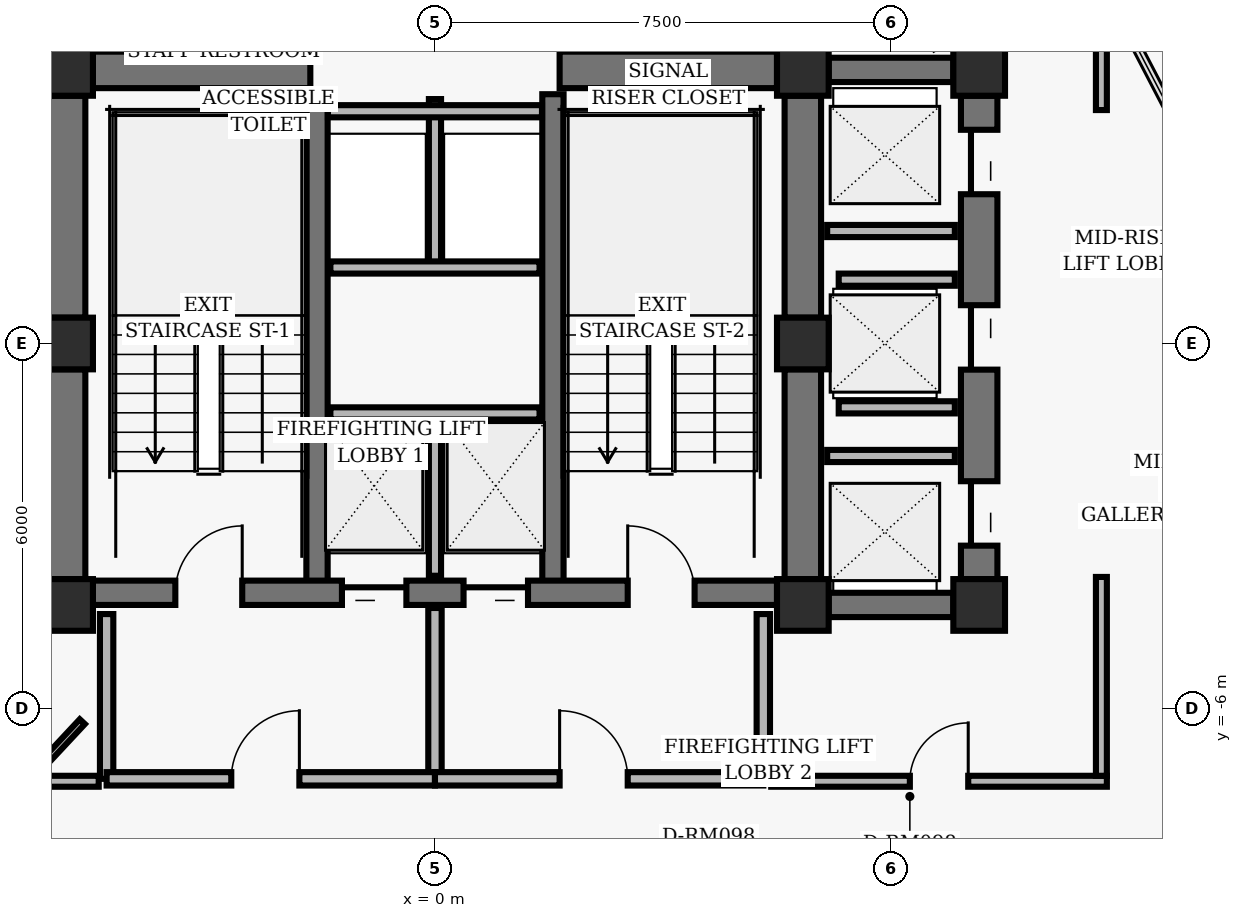
"""IFC4 building model, lengths in metres.
Left out: names, types, materials, properties, quantities, classifications, styles, units other than length and angle.
Written with IfcOpenShell. Run it as: python <this file> out.ifc"""

import sys

from ifc_helpers import new_model, si_unit, direction, frame, frame_2d, origin, origin_2d, place, context, subcontext, project, spatial, rectangle, hollow_rectangle, extrude, element, fill, save


model = new_model("IFC4")
c1 = context("Model", 3, precision=1e-05, world=origin(), true_north=direction((0.0, 1.0)))
c2 = subcontext(c1, "Body", "Model", "MODEL_VIEW")
j1 = project(units=[si_unit("LENGTHUNIT", "METRE"), si_unit("PLANEANGLEUNIT", "RADIAN")], contexts=[c1])
p1 = place(None, origin())
s1 = spatial("IfcSite", under=j1, at=p1, CompositionType="ELEMENT")
p2 = place(p1, origin())
s2 = spatial("IfcBuilding", under=s1, at=p2, CompositionType="ELEMENT")
p3 = place(p2, frame((0.0, 0.0, 144.16)))
s3 = spatial("IfcBuildingStorey", under=s2, at=p3, CompositionType="ELEMENT", Elevation=144.16)
for number, where, z_axis, x_axis in (
    (1, (-6.05, 4.5, 0.0), (0.0, 0.0, 1.0), (1.0, 0.0, 0.0)),
    (2, (6.05, 4.5, 0.0), (0.0, 0.0, 1.0), (1.0, 0.0, 0.0)),
    (3, (-6.05, 0.0, 0.0), (0.0, 0.0, 1.0), (1.0, 0.0, 0.0)),
    (4, (6.05, 0.0, 0.0), (0.0, 0.0, 1.0), (1.0, 0.0, 0.0)),
    (5, (-6.05, -4.3, 0.0), (0.0, 0.0, 1.0), (1.0, 0.0, 0.0)),
    (6, (6.05, -4.3, 0.0), (0.0, 0.0, 1.0), (1.0, 0.0, 0.0)),
    (7, (8.95, 4.5, 0.0), (0.0, 0.0, 1.0), (1.0, 0.0, 0.0)),
    (8, (8.95, -4.3, 0.0), (0.0, 0.0, 1.0), (1.0, 0.0, 0.0)),
):
    element("IfcColumn", number, at=place(p3, frame(where, z_axis=z_axis, x_axis=x_axis)), inside=s3, PredefinedType="COLUMN", context=c2, shape_type="SweptSolid", body=[
        extrude(hollow_rectangle(XDim=0.85, YDim=0.85, WallThickness=0.055, InnerFilletRadius=0.02, OuterFilletRadius=0.04, at=origin_2d()), origin(), (0.0, 0.0, 1.0), 3.04),
    ])
p4 = place(p3, frame((-6.05, 0.425, 0.0), z_axis=(0.0, 0.0, 1.0), x_axis=(0.0, 1.0, 0.0)))
e9 = element("IfcWall", 9, at=p4, inside=s3, PredefinedType="SHEAR", context=c2, shape_type="SweptSolid", body=[
    extrude(rectangle(XDim=3.65, YDim=0.6, at=frame_2d((1.825, 0.0))), origin(), (0.0, 0.0, 1.0), 2.618),
])
p5 = place(p3, frame((-6.05, -3.875, 0.0), z_axis=(0.0, 0.0, 1.0), x_axis=(0.0, 1.0, 0.0)))
e10 = element("IfcWall", 10, at=p5, inside=s3, PredefinedType="SHEAR", context=c2, shape_type="SweptSolid", body=[
    extrude(rectangle(XDim=3.45, YDim=0.6, at=frame_2d((1.725, 0.0))), origin(), (0.0, 0.0, 1.0), 2.618),
])
p6 = place(p3, frame((6.05, 0.425, 0.0), z_axis=(0.0, 0.0, 1.0), x_axis=(0.0, 1.0, 0.0)))
e11 = element("IfcWall", 11, at=p6, inside=s3, PredefinedType="SHEAR", context=c2, shape_type="SweptSolid", body=[
    extrude(rectangle(XDim=3.65, YDim=0.6, at=frame_2d((1.825, 0.0))), origin(), (0.0, 0.0, 1.0), 2.618),
])
p7 = place(p3, frame((6.05, -3.875, 0.0), z_axis=(0.0, 0.0, 1.0), x_axis=(0.0, 1.0, 0.0)))
e12 = element("IfcWall", 12, at=p7, inside=s3, PredefinedType="SHEAR", context=c2, shape_type="SweptSolid", body=[
    extrude(rectangle(XDim=3.45, YDim=0.6, at=frame_2d((1.725, 0.0))), origin(), (0.0, 0.0, 1.0), 2.618),
])
for number, where, z_axis, x_axis in (
    (13, (-1.94, -4.1, 0.0), (0.0, 0.0, 1.0), (0.0, 1.0, 0.0)),
    (14, (1.94, -4.1, 0.0), (0.0, 0.0, 1.0), (0.0, 1.0, 0.0)),
):
    element("IfcWall", number, at=place(p3, frame(where, z_axis=z_axis, x_axis=x_axis)), inside=s3, PredefinedType="SHEAR", context=c2, shape_type="SweptSolid", body=[
        extrude(rectangle(XDim=8.2, YDim=0.35, at=frame_2d((4.1, 0.0))), origin(), (0.0, 0.0, 1.0), 2.618),
    ])
p8 = place(p3, frame((-5.625, -4.1, 0.0), z_axis=(0.0, 0.0, 1.0), x_axis=(1.0, 0.0, 0.0)))
e15 = element("IfcWall", 15, at=p8, inside=s3, PredefinedType="SHEAR", context=c2, shape_type="SweptSolid", body=[
    extrude(rectangle(XDim=11.25, YDim=0.4, at=frame_2d((5.625, 0.0))), origin(), (0.0, 0.0, 1.0), 2.618),
])
p9 = place(p8, frame((1.355, 0.0, 0.0)))
e16 = element("IfcOpeningElement", 16, at=p9, cuts=e15, PredefinedType="OPENING", context=c2, shape_type="SweptSolid", body=[
    extrude(rectangle(XDim=1.1, YDim=2.04, at=frame_2d((0.55, 1.02))), frame((0.0, 0.21, 0.0), z_axis=(0.0, -1.0, 0.0), x_axis=(1.0, 0.0, 0.0)), (0.0, 0.0, 1.0), 0.42),
])
p10 = place(p8, frame((8.795, 0.0, 0.0)))
e17 = element("IfcOpeningElement", 17, at=p10, cuts=e15, PredefinedType="OPENING", context=c2, shape_type="SweptSolid", body=[
    extrude(rectangle(XDim=1.1, YDim=2.04, at=frame_2d((0.55, 1.02))), frame((0.0, 0.21, 0.0), z_axis=(0.0, -1.0, 0.0), x_axis=(1.0, 0.0, 0.0)), (0.0, 0.0, 1.0), 0.42),
])
p11 = place(p8, frame((4.095, 0.0, 0.0)))
e18 = element("IfcOpeningElement", 18, at=p11, cuts=e15, PredefinedType="OPENING", context=c2, shape_type="SweptSolid", body=[
    extrude(rectangle(XDim=1.06, YDim=2.04, at=frame_2d((0.53, 1.02))), frame((0.0, 0.21, 0.0), z_axis=(0.0, -1.0, 0.0), x_axis=(1.0, 0.0, 0.0)), (0.0, 0.0, 1.0), 0.42),
])
p12 = place(p8, frame((6.095, 0.0, 0.0)))
e19 = element("IfcOpeningElement", 19, at=p12, cuts=e15, PredefinedType="OPENING", context=c2, shape_type="SweptSolid", body=[
    extrude(rectangle(XDim=1.06, YDim=2.04, at=frame_2d((0.53, 1.02))), frame((0.0, 0.21, 0.0), z_axis=(0.0, -1.0, 0.0), x_axis=(1.0, 0.0, 0.0)), (0.0, 0.0, 1.0), 0.42),
])
for number, where, z_axis, x_axis in (
    (20, (-5.625, 4.5, 0.0), (0.0, 0.0, 1.0), (1.0, 0.0, 0.0)),
    (21, (2.05, 4.5, 0.0), (0.0, 0.0, 1.0), (1.0, 0.0, 0.0)),
):
    element("IfcWall", number, at=place(p3, frame(where, z_axis=z_axis, x_axis=x_axis)), inside=s3, PredefinedType="SHEAR", context=c2, shape_type="SweptSolid", body=[
        extrude(rectangle(XDim=3.575, YDim=0.6, at=frame_2d((1.788, 0.0))), origin(), (0.0, 0.0, 1.0), 2.618),
    ])
p13 = place(p3, frame((8.95, -3.875, 0.0), z_axis=(0.0, 0.0, 1.0), x_axis=(0.0, 1.0, 0.0)))
e22 = element("IfcWall", 22, at=p13, inside=s3, PredefinedType="SHEAR", context=c2, shape_type="SweptSolid", body=[
    extrude(rectangle(XDim=7.95, YDim=0.6, at=frame_2d((3.975, 0.0))), origin(), (0.0, 0.0, 1.0), 2.618),
])
p14 = place(p13, frame((0.55, 0.0, 0.0)))
e23 = element("IfcOpeningElement", 23, at=p14, cuts=e22, PredefinedType="OPENING", context=c2, shape_type="SweptSolid", body=[
    extrude(rectangle(XDim=1.06, YDim=2.04, at=frame_2d((0.53, 1.02))), frame((0.0, 0.31, 0.0), z_axis=(0.0, -1.0, 0.0), x_axis=(1.0, 0.0, 0.0)), (0.0, 0.0, 1.0), 0.62),
])
p15 = place(p13, frame((3.445, 0.0, 0.0)))
e24 = element("IfcOpeningElement", 24, at=p15, cuts=e22, PredefinedType="OPENING", context=c2, shape_type="SweptSolid", body=[
    extrude(rectangle(XDim=1.06, YDim=2.04, at=frame_2d((0.53, 1.02))), frame((0.0, 0.31, 0.0), z_axis=(0.0, -1.0, 0.0), x_axis=(1.0, 0.0, 0.0)), (0.0, 0.0, 1.0), 0.62),
])
p16 = place(p13, frame((6.33, 0.0, 0.0)))
e25 = element("IfcOpeningElement", 25, at=p16, cuts=e22, PredefinedType="OPENING", context=c2, shape_type="SweptSolid", body=[
    extrude(rectangle(XDim=1.06, YDim=2.04, at=frame_2d((0.53, 1.02))), frame((0.0, 0.31, 0.0), z_axis=(0.0, -1.0, 0.0), x_axis=(1.0, 0.0, 0.0)), (0.0, 0.0, 1.0), 0.62),
])
for number, where, z_axis, x_axis in (
    (26, (6.475, 4.5, 0.0), (0.0, 0.0, 1.0), (1.0, 0.0, 0.0)),
    (27, (6.475, -4.3, 0.0), (0.0, 0.0, 1.0), (1.0, 0.0, 0.0)),
):
    element("IfcWall", number, at=place(p3, frame(where, z_axis=z_axis, x_axis=x_axis)), inside=s3, PredefinedType="SHEAR", context=c2, shape_type="SweptSolid", body=[
        extrude(rectangle(XDim=2.05, YDim=0.4, at=frame_2d((1.025, 0.0))), origin(), (0.0, 0.0, 1.0), 2.618),
    ])
p17 = place(p3, frame((0.0, -3.82, 0.0), z_axis=(0.0, 0.0, 1.0), x_axis=(0.0, 1.0, 0.0)))
e28 = element("IfcWall", 28, at=p17, inside=s3, PredefinedType="PARTITIONING", context=c2, shape_type="SweptSolid", body=[
    extrude(rectangle(XDim=2.67, YDim=0.2, at=frame_2d((1.335, 0.0))), origin(), (0.0, 0.0, 1.0), 2.593),
])
p18 = place(p3, frame((-1.72, -1.15, 0.0), z_axis=(0.0, 0.0, 1.0), x_axis=(1.0, 0.0, 0.0)))
e29 = element("IfcWall", 29, at=p18, inside=s3, PredefinedType="PARTITIONING", context=c2, shape_type="SweptSolid", body=[
    extrude(rectangle(XDim=3.44, YDim=0.2, at=frame_2d((1.72, 0.0))), origin(), (0.0, 0.0, 1.0), 2.593),
])
for number, where, z_axis, x_axis in (
    (30, (-5.4, -7.16, 0.0), (0.0, 0.0, 1.0), (0.0, 1.0, 0.0)),
    (31, (5.4, -7.16, 0.0), (0.0, 0.0, 1.0), (0.0, 1.0, 0.0)),
):
    element("IfcWall", number, at=place(p3, frame(where, z_axis=z_axis, x_axis=x_axis)), inside=s3, PredefinedType="PARTITIONING", context=c2, shape_type="SweptSolid", body=[
        extrude(rectangle(XDim=2.71, YDim=0.22, at=frame_2d((1.355, 0.0))), origin(), (0.0, 0.0, 1.0), 2.593),
    ])
p19 = place(p3, frame((0.0, -7.16, 0.0), z_axis=(0.0, 0.0, 1.0), x_axis=(0.0, 1.0, 0.0)))
e32 = element("IfcWall", 32, at=p19, inside=s3, PredefinedType="PARTITIONING", context=c2, shape_type="SweptSolid", body=[
    extrude(rectangle(XDim=2.81, YDim=0.22, at=frame_2d((1.405, 0.0))), origin(), (0.0, 0.0, 1.0), 2.593),
])
p20 = place(p3, frame((-5.4, -7.16, 0.0), z_axis=(0.0, 0.0, 1.0), x_axis=(1.0, 0.0, 0.0)))
e33 = element("IfcWall", 33, at=p20, inside=s3, PredefinedType="PARTITIONING", context=c2, shape_type="SweptSolid", body=[
    extrude(rectangle(XDim=5.4, YDim=0.22, at=frame_2d((2.7, 0.0))), origin(), (0.0, 0.0, 1.0), 2.16),
])
p21 = place(p20, frame((2.05, 0.0, 0.0)))
e34 = element("IfcOpeningElement", 34, at=p21, cuts=e33, PredefinedType="OPENING", context=c2, shape_type="SweptSolid", body=[
    extrude(rectangle(XDim=1.12, YDim=2.02, at=frame_2d((0.56, 1.01))), frame((0.0, 0.12, 0.0), z_axis=(0.0, -1.0, 0.0), x_axis=(1.0, 0.0, 0.0)), (0.0, 0.0, 1.0), 0.24),
])
p22 = place(p3, frame((0.0, -7.16, 0.0), z_axis=(0.0, 0.0, 1.0), x_axis=(1.0, 0.0, 0.0)))
e35 = element("IfcWall", 35, at=p22, inside=s3, PredefinedType="PARTITIONING", context=c2, shape_type="SweptSolid", body=[
    extrude(rectangle(XDim=5.4, YDim=0.22, at=frame_2d((2.7, 0.0))), origin(), (0.0, 0.0, 1.0), 2.16),
])
p23 = place(p22, frame((2.05, 0.0, 0.0)))
e36 = element("IfcOpeningElement", 36, at=p23, cuts=e35, PredefinedType="OPENING", context=c2, shape_type="SweptSolid", body=[
    extrude(rectangle(XDim=1.12, YDim=2.02, at=frame_2d((0.56, 1.01))), frame((0.0, 0.12, 0.0), z_axis=(0.0, -1.0, 0.0), x_axis=(1.0, 0.0, 0.0)), (0.0, 0.0, 1.0), 0.24),
])
p24 = place(p3, frame((0.0, 1.25, 0.0), z_axis=(0.0, 0.0, 1.0), x_axis=(0.0, 1.0, 0.0)))
e37 = element("IfcWall", 37, at=p24, inside=s3, PredefinedType="PARTITIONING", context=c2, shape_type="SweptSolid", body=[
    extrude(rectangle(XDim=2.77, YDim=0.2, at=frame_2d((1.385, 0.0))), origin(), (0.0, 0.0, 1.0), 2.593),
])
p25 = place(p3, frame((-1.72, 1.25, 0.0), z_axis=(0.0, 0.0, 1.0), x_axis=(1.0, 0.0, 0.0)))
e38 = element("IfcWall", 38, at=p25, inside=s3, PredefinedType="PARTITIONING", context=c2, shape_type="SweptSolid", body=[
    extrude(rectangle(XDim=3.44, YDim=0.2, at=frame_2d((1.72, 0.0))), origin(), (0.0, 0.0, 1.0), 2.593),
])
p26 = place(p3, frame((-1.76, 3.82, 0.0), z_axis=(0.0, 0.0, 1.0), x_axis=(1.0, 0.0, 0.0)))
e39 = element("IfcWall", 39, at=p26, inside=s3, PredefinedType="PARTITIONING", context=c2, shape_type="SweptSolid", body=[
    extrude(rectangle(XDim=3.52, YDim=0.2, at=frame_2d((1.76, 0.0))), origin(), (0.0, 0.0, 1.0), 2.593),
])
for number, where, z_axis, x_axis in (
    (40, (6.45, -1.85, 0.0), (0.0, 0.0, 1.0), (1.0, 0.0, 0.0)),
    (41, (6.45, 1.85, 0.0), (0.0, 0.0, 1.0), (1.0, 0.0, 0.0)),
):
    element("IfcWall", number, at=place(p3, frame(where, z_axis=z_axis, x_axis=x_axis)), inside=s3, PredefinedType="PARTITIONING", context=c2, shape_type="SweptSolid", body=[
        extrude(rectangle(XDim=2.1, YDim=0.2, at=frame_2d((1.05, 0.0))), origin(), (0.0, 0.0, 1.0), 2.593),
    ])
for number, where, z_axis, x_axis in (
    (42, (6.64, -1.05, 0.0), (0.0, 0.0, 1.0), (1.0, 0.0, 0.0)),
    (43, (6.64, 1.05, 0.0), (0.0, 0.0, 1.0), (1.0, 0.0, 0.0)),
):
    element("IfcWall", number, at=place(p3, frame(where, z_axis=z_axis, x_axis=x_axis)), inside=s3, PredefinedType="PARTITIONING", context=c2, shape_type="SweptSolid", body=[
        extrude(rectangle(XDim=1.91, YDim=0.2, at=frame_2d((0.955, 0.0))), origin(), (0.0, 0.0, 1.0), 2.593),
    ])
p27 = place(p3, frame((10.003, 9.07, 0.0), z_axis=(0.0, 0.0, 1.0), x_axis=(0.461740291408, -0.887015165198, 0.0)))
e44 = element("IfcWall", 44, at=p27, inside=s3, PredefinedType="PARTITIONING", context=c2, shape_type="SweptSolid", body=[
    extrude(rectangle(XDim=9.976, YDim=0.18, at=frame_2d((4.988, 0.0))), origin(), (0.0, 0.0, 1.0), 2.593),
])
p28 = place(p27, frame((5.689, 0.0, 0.0)))
e45 = element("IfcOpeningElement", 45, at=p28, cuts=e44, PredefinedType="OPENING", context=c2, shape_type="SweptSolid", body=[
    extrude(rectangle(XDim=0.96, YDim=2.02, at=frame_2d((0.48, 1.01))), frame((0.0, 0.1, 0.0), z_axis=(0.0, -1.0, 0.0), x_axis=(1.0, 0.0, 0.0)), (0.0, 0.0, 1.0), 0.2),
])
p29 = place(p3, frame((5.53, -7.2, 0.0), z_axis=(0.0, 0.0, 1.0), x_axis=(1.0, 0.0, 0.0)))
e46 = element("IfcWall", 46, at=p29, inside=s3, PredefinedType="PARTITIONING", context=c2, shape_type="SweptSolid", body=[
    extrude(rectangle(XDim=5.52, YDim=0.18, at=frame_2d((2.76, 0.0))), origin(), (0.0, 0.0, 1.0), 2.16),
])
p30 = place(p29, frame((2.28, 0.0, 0.0)))
e47 = element("IfcOpeningElement", 47, at=p30, cuts=e46, PredefinedType="OPENING", context=c2, shape_type="SweptSolid", body=[
    extrude(rectangle(XDim=0.96, YDim=2.02, at=frame_2d((0.48, 1.01))), frame((0.0, 0.1, 0.0), z_axis=(0.0, -1.0, 0.0), x_axis=(1.0, 0.0, 0.0)), (0.0, 0.0, 1.0), 0.2),
])
for number, where, z_axis, x_axis in (
    (48, (10.96, -7.11, 0.0), (0.0, 0.0, 1.0), (0.0, 1.0, 0.0)),
    (49, (10.96, 3.84, 0.0), (0.0, 0.0, 1.0), (0.0, 1.0, 0.0)),
):
    element("IfcWall", number, at=place(p3, frame(where, z_axis=z_axis, x_axis=x_axis)), inside=s3, PredefinedType="PARTITIONING", context=c2, shape_type="SweptSolid", body=[
        extrude(rectangle(XDim=3.271, YDim=0.18, at=frame_2d((1.635, 0.0))), origin(), (0.0, 0.0, 1.0), 2.593),
    ])
p31 = place(p3, frame((-6.59, -7.2, 0.0), z_axis=(0.0, 0.0, 1.0), x_axis=(1.0, 0.0, 0.0)))
e50 = element("IfcWall", 50, at=p31, inside=s3, PredefinedType="PARTITIONING", context=c2, shape_type="SweptSolid", body=[
    extrude(rectangle(XDim=1.06, YDim=0.18, at=frame_2d((0.53, 0.0))), origin(), (0.0, 0.0, 1.0), 2.16),
])
p32 = place(p3, frame((-5.8, -6.22, 0.0), z_axis=(0.0, 0.0, 1.0), x_axis=(-0.681964083565, -0.731385663469, 0.0)))
e51 = element("IfcWall", 51, at=p32, inside=s3, PredefinedType="MOVABLE", context=c2, shape_type="SweptSolid", body=[
    extrude(rectangle(XDim=0.909, YDim=0.115, at=frame_2d((0.455, 0.0))), origin(), (0.0, 0.0, 1.0), 2.593),
])
p33 = place(p9, origin())
e52 = element("IfcDoor", 52, at=p33, inside=s3, OperationType="SINGLE_SWING_RIGHT", PredefinedType="DOOR", context=c2, shape_type="SweptSolid", body=[
    extrude(rectangle(XDim=1.1, YDim=2.04, at=frame_2d((0.55, 1.02))), frame((0.0, 0.025, 0.0), z_axis=(0.0, -1.0, 0.0), x_axis=(1.0, 0.0, 0.0)), (0.0, 0.0, 1.0), 0.05),
])
fill(e16, e52)
p34 = place(p10, origin())
e53 = element("IfcDoor", 53, at=p34, inside=s3, OperationType="SINGLE_SWING_LEFT", PredefinedType="DOOR", context=c2, shape_type="SweptSolid", body=[
    extrude(rectangle(XDim=1.1, YDim=2.04, at=frame_2d((0.55, 1.02))), frame((0.0, 0.025, 0.0), z_axis=(0.0, -1.0, 0.0), x_axis=(1.0, 0.0, 0.0)), (0.0, 0.0, 1.0), 0.05),
])
fill(e17, e53)
p35 = place(p11, origin())
e54 = element("IfcDoor", 54, at=p35, inside=s3, OperationType="SLIDING_TO_LEFT", PredefinedType="DOOR", context=c2, shape_type="SweptSolid", body=[
    extrude(rectangle(XDim=1.06, YDim=2.04, at=frame_2d((0.53, 1.02))), frame((0.0, 0.025, 0.0), z_axis=(0.0, -1.0, 0.0), x_axis=(1.0, 0.0, 0.0)), (0.0, 0.0, 1.0), 0.05),
])
fill(e18, e54)
p36 = place(p12, origin())
e55 = element("IfcDoor", 55, at=p36, inside=s3, OperationType="SLIDING_TO_RIGHT", PredefinedType="DOOR", context=c2, shape_type="SweptSolid", body=[
    extrude(rectangle(XDim=1.06, YDim=2.04, at=frame_2d((0.53, 1.02))), frame((0.0, 0.025, 0.0), z_axis=(0.0, -1.0, 0.0), x_axis=(1.0, 0.0, 0.0)), (0.0, 0.0, 1.0), 0.05),
])
fill(e19, e55)
p37 = place(p21, origin())
e56 = element("IfcDoor", 56, at=p37, inside=s3, OperationType="SINGLE_SWING_RIGHT", PredefinedType="DOOR", context=c2, shape_type="SweptSolid", body=[
    extrude(rectangle(XDim=1.12, YDim=2.02, at=frame_2d((0.56, 1.01))), frame((0.0, 0.025, 0.0), z_axis=(0.0, -1.0, 0.0), x_axis=(1.0, 0.0, 0.0)), (0.0, 0.0, 1.0), 0.05),
])
fill(e34, e56)
p38 = place(p23, origin())
e57 = element("IfcDoor", 57, at=p38, inside=s3, OperationType="SINGLE_SWING_LEFT", PredefinedType="DOOR", context=c2, shape_type="SweptSolid", body=[
    extrude(rectangle(XDim=1.12, YDim=2.02, at=frame_2d((0.56, 1.01))), frame((0.0, 0.025, 0.0), z_axis=(0.0, -1.0, 0.0), x_axis=(1.0, 0.0, 0.0)), (0.0, 0.0, 1.0), 0.05),
])
fill(e36, e57)
p39 = place(p14, origin())
e58 = element("IfcDoor", 58, at=p39, inside=s3, OperationType="SLIDING_TO_LEFT", PredefinedType="DOOR", context=c2, shape_type="SweptSolid", body=[
    extrude(rectangle(XDim=1.06, YDim=2.04, at=frame_2d((0.53, 1.02))), frame((0.0, 0.025, 0.0), z_axis=(0.0, -1.0, 0.0), x_axis=(1.0, 0.0, 0.0)), (0.0, 0.0, 1.0), 0.05),
])
fill(e23, e58)
p40 = place(p15, origin())
e59 = element("IfcDoor", 59, at=p40, inside=s3, OperationType="SLIDING_TO_RIGHT", PredefinedType="DOOR", context=c2, shape_type="SweptSolid", body=[
    extrude(rectangle(XDim=1.06, YDim=2.04, at=frame_2d((0.53, 1.02))), frame((0.0, 0.025, 0.0), z_axis=(0.0, -1.0, 0.0), x_axis=(1.0, 0.0, 0.0)), (0.0, 0.0, 1.0), 0.05),
])
fill(e24, e59)
p41 = place(p16, origin())
e60 = element("IfcDoor", 60, at=p41, inside=s3, OperationType="SLIDING_TO_LEFT", PredefinedType="DOOR", context=c2, shape_type="SweptSolid", body=[
    extrude(rectangle(XDim=1.06, YDim=2.04, at=frame_2d((0.53, 1.02))), frame((0.0, 0.025, 0.0), z_axis=(0.0, -1.0, 0.0), x_axis=(1.0, 0.0, 0.0)), (0.0, 0.0, 1.0), 0.05),
])
fill(e25, e60)
p42 = place(p30, origin())
e61 = element("IfcDoor", 61, at=p42, inside=s3, OperationType="SINGLE_SWING_RIGHT", PredefinedType="DOOR", context=c2, shape_type="SweptSolid", body=[
    extrude(rectangle(XDim=0.96, YDim=2.02, at=frame_2d((0.48, 1.01))), frame((0.0, 0.025, 0.0), z_axis=(0.0, -1.0, 0.0), x_axis=(1.0, 0.0, 0.0)), (0.0, 0.0, 1.0), 0.05),
])
fill(e47, e61)
save(model, sys.argv[1])
